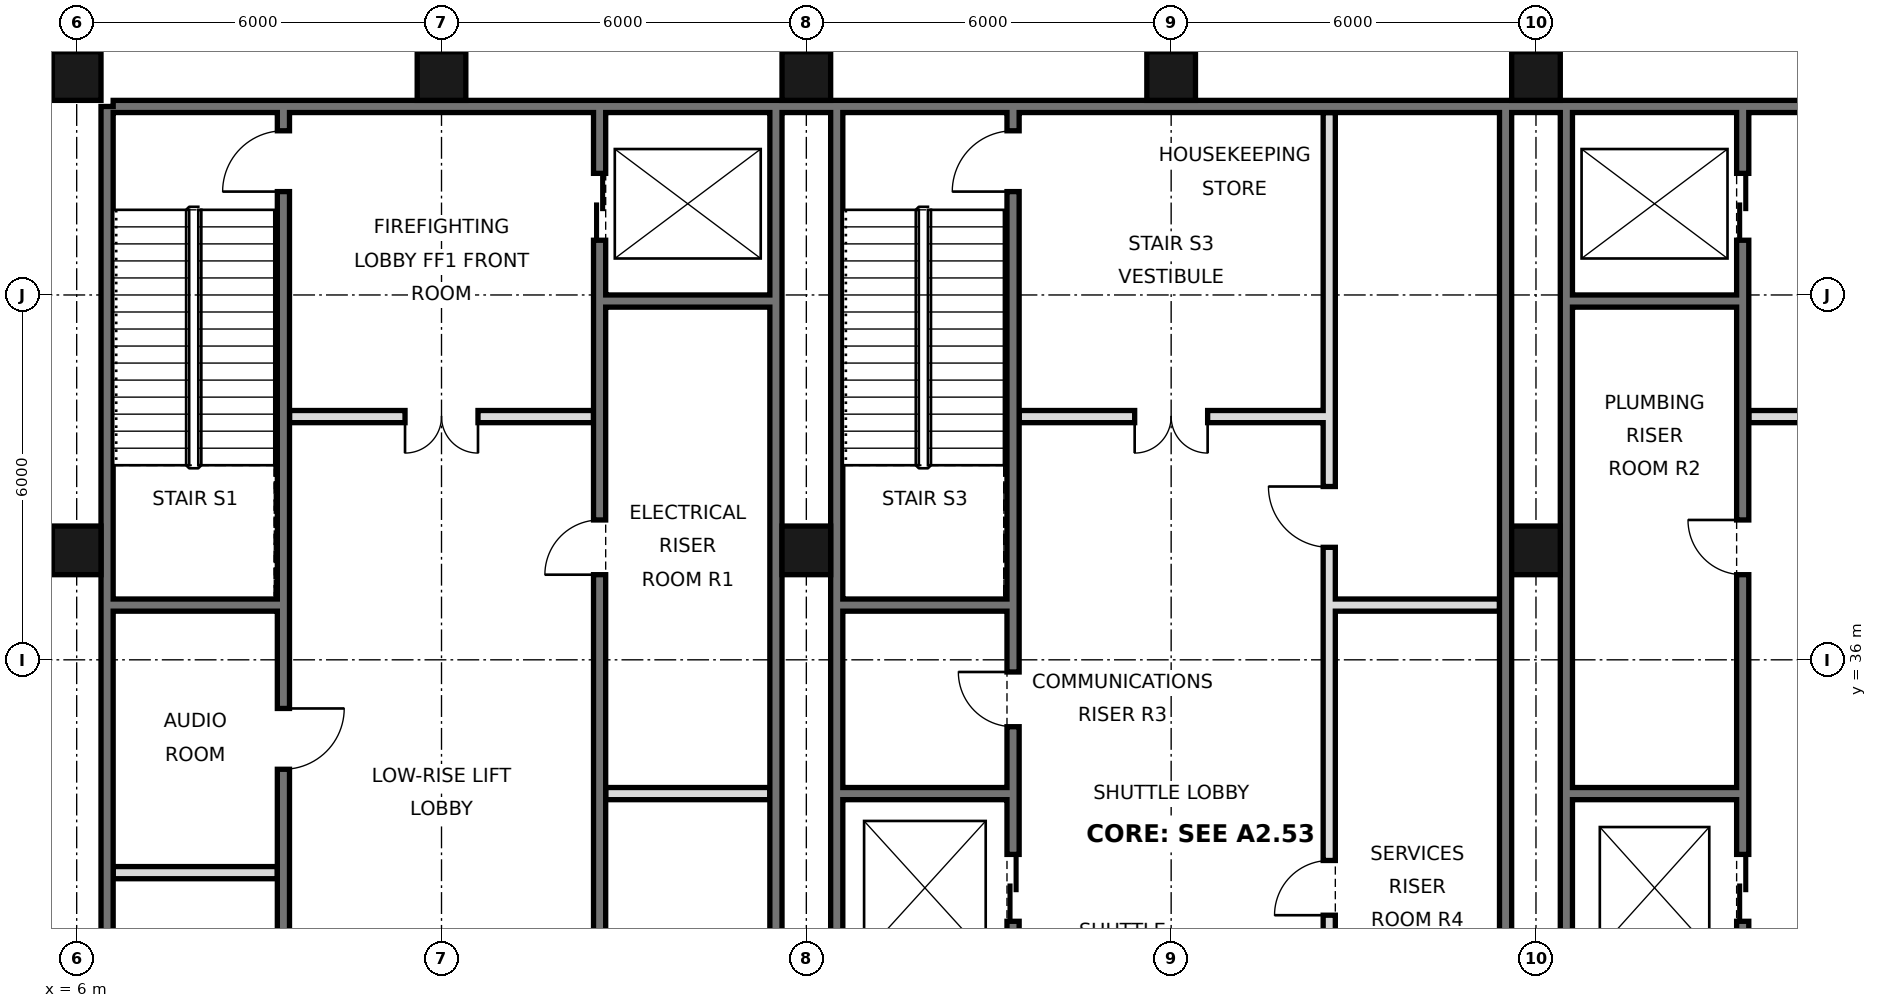
"""IFC4 building model, lengths in metres.
Left out: names, types, materials, properties, quantities, classifications, styles, units other than length and angle.
Written with IfcOpenShell. Run it as: python <this file> out.ifc"""

import sys

from ifc_helpers import new_model, si_unit, direction, frame, frame_2d, origin, origin_2d, place, context, subcontext, project, spatial, rectangle, hollow_rectangle, extrude, element, fill, save


model = new_model("IFC4")
c1 = context("Model", 3, precision=1e-05, world=origin(), true_north=direction((0.0, 1.0)))
c2 = subcontext(c1, "Body", "Model", "MODEL_VIEW")
j1 = project(units=[si_unit("LENGTHUNIT", "METRE"), si_unit("PLANEANGLEUNIT", "RADIAN")], contexts=[c1])
p1 = place(None, origin())
s1 = spatial("IfcSite", under=j1, at=p1, CompositionType="ELEMENT")
p2 = place(p1, origin())
s2 = spatial("IfcBuilding", under=s1, at=p2, CompositionType="ELEMENT")
p3 = place(p2, frame((0.0, 0.0, 210.0)))
s3 = spatial("IfcBuildingStorey", under=s2, at=p3, CompositionType="ELEMENT", Elevation=210.0)
for number, where, z_axis, x_axis in (
    (1, (6.0, 37.8, 0.0), (0.0, 0.0, 1.0), (1.0, 0.0, 0.0)),
    (2, (6.0, 45.6, 0.0), (0.0, 0.0, 1.0), (1.0, 0.0, 0.0)),
    (3, (12.0, 45.6, 0.0), (0.0, 0.0, 1.0), (1.0, 0.0, 0.0)),
    (4, (18.0, 37.8, 0.0), (0.0, 0.0, 1.0), (1.0, 0.0, 0.0)),
    (5, (18.0, 45.6, 0.0), (0.0, 0.0, 1.0), (1.0, 0.0, 0.0)),
    (6, (24.0, 45.6, 0.0), (0.0, 0.0, 1.0), (1.0, 0.0, 0.0)),
    (7, (30.0, 37.8, 0.0), (0.0, 0.0, 1.0), (1.0, 0.0, 0.0)),
    (8, (30.0, 45.6, 0.0), (0.0, 0.0, 1.0), (1.0, 0.0, 0.0)),
):
    element("IfcColumn", number, at=place(p3, frame(where, z_axis=z_axis, x_axis=x_axis)), inside=s3, PredefinedType="COLUMN", context=c2, shape_type="SweptSolid", body=[
        extrude(hollow_rectangle(XDim=0.8, YDim=0.8, WallThickness=0.04, at=origin_2d()), origin(), (0.0, 0.0, 1.0), 5.4),
    ])
p4 = place(p3, frame((6.5, 21.6, 0.0), z_axis=(0.0, 0.0, 1.0), x_axis=(0.0, 1.0, 0.0)))
e9 = element("IfcWall", 9, at=p4, inside=s3, PredefinedType="SOLIDWALL", context=c2, shape_type="SweptSolid", body=[
    extrude(rectangle(XDim=23.5, YDim=0.2, at=frame_2d((11.75, 0.0))), origin(), (0.0, 0.0, 1.0), 5.22),
])
p5 = place(p3, frame((6.6, 45.1, 0.0), z_axis=(0.0, 0.0, 1.0), x_axis=(1.0, 0.0, 0.0)))
e10 = element("IfcWall", 10, at=p5, inside=s3, PredefinedType="SOLIDWALL", context=c2, shape_type="SweptSolid", body=[
    extrude(rectangle(XDim=34.8, YDim=0.2, at=frame_2d((17.4, 0.0))), origin(), (0.0, 0.0, 1.0), 5.22),
])
for number, where, z_axis, x_axis in (
    (11, (17.5, 27.6, 0.0), (0.0, 0.0, 1.0), (0.0, 1.0, 0.0)),
    (12, (18.5, 27.6, 0.0), (0.0, 0.0, 1.0), (0.0, 1.0, 0.0)),
    (13, (29.5, 27.6, 0.0), (0.0, 0.0, 1.0), (0.0, 1.0, 0.0)),
    (14, (30.5, 27.6, 0.0), (0.0, 0.0, 1.0), (0.0, 1.0, 0.0)),
):
    element("IfcWall", number, at=place(p3, frame(where, z_axis=z_axis, x_axis=x_axis)), inside=s3, PredefinedType="SOLIDWALL", context=c2, shape_type="SweptSolid", body=[
        extrude(rectangle(XDim=17.5, YDim=0.2, at=frame_2d((8.75, 0.0))), origin(), (0.0, 0.0, 1.0), 5.22),
    ])
p6 = place(p3, frame((14.6, 27.5, 0.0), z_axis=(0.0, 0.0, 1.0), x_axis=(0.0, 1.0, 0.0)))
e15 = element("IfcWall", 15, at=p6, inside=s3, PredefinedType="SOLIDWALL", context=c2, shape_type="SweptSolid", body=[
    extrude(rectangle(XDim=17.5, YDim=0.2, at=frame_2d((8.75, 0.0))), origin(), (0.0, 0.0, 1.0), 5.22),
])
p7 = place(p6, frame((15.4, 0.0, 0.0)))
e16 = element("IfcOpeningElement", 16, at=p7, cuts=e15, PredefinedType="OPENING", context=c2, shape_type="SweptSolid", body=[
    extrude(rectangle(XDim=1.1, YDim=2.1, at=frame_2d((0.55, 1.05))), frame((0.0, 0.11, 0.0), z_axis=(0.0, -1.0, 0.0), x_axis=(1.0, 0.0, 0.0)), (0.0, 0.0, 1.0), 0.22),
])
p8 = place(p6, frame((2.7, 0.0, 0.0)))
e17 = element("IfcOpeningElement", 17, at=p8, cuts=e15, PredefinedType="OPENING", context=c2, shape_type="SweptSolid", body=[
    extrude(rectangle(XDim=1.0, YDim=2.1, at=frame_2d((0.5, 1.05))), frame((0.0, 0.11, 0.0), z_axis=(0.0, -1.0, 0.0), x_axis=(1.0, 0.0, 0.0)), (0.0, 0.0, 1.0), 0.22),
])
p9 = place(p6, frame((9.9, 0.0, 0.0)))
e18 = element("IfcOpeningElement", 18, at=p9, cuts=e15, PredefinedType="OPENING", context=c2, shape_type="SweptSolid", body=[
    extrude(rectangle(XDim=0.9, YDim=2.1, at=frame_2d((0.45, 1.05))), frame((0.0, 0.11, 0.0), z_axis=(0.0, -1.0, 0.0), x_axis=(1.0, 0.0, 0.0)), (0.0, 0.0, 1.0), 0.22),
])
p10 = place(p3, frame((21.4, 27.5, 0.0), z_axis=(0.0, 0.0, 1.0), x_axis=(0.0, 1.0, 0.0)))
e19 = element("IfcWall", 19, at=p10, inside=s3, PredefinedType="SOLIDWALL", context=c2, shape_type="SweptSolid", body=[
    extrude(rectangle(XDim=17.5, YDim=0.2, at=frame_2d((8.75, 0.0))), origin(), (0.0, 0.0, 1.0), 5.22),
])
p11 = place(p10, frame((1.1, 0.0, 0.0)))
e20 = element("IfcOpeningElement", 20, at=p11, cuts=e19, PredefinedType="OPENING", context=c2, shape_type="SweptSolid", body=[
    extrude(rectangle(XDim=1.1, YDim=2.1, at=frame_2d((0.55, 1.05))), frame((0.0, 0.11, 0.0), z_axis=(0.0, -1.0, 0.0), x_axis=(1.0, 0.0, 0.0)), (0.0, 0.0, 1.0), 0.22),
])
p12 = place(p10, frame((4.2, 0.0, 0.0)))
e21 = element("IfcOpeningElement", 21, at=p12, cuts=e19, PredefinedType="OPENING", context=c2, shape_type="SweptSolid", body=[
    extrude(rectangle(XDim=1.1, YDim=2.1, at=frame_2d((0.55, 1.05))), frame((0.0, 0.11, 0.0), z_axis=(0.0, -1.0, 0.0), x_axis=(1.0, 0.0, 0.0)), (0.0, 0.0, 1.0), 0.22),
])
p13 = place(p10, frame((16.2, 0.0, 0.0)))
e22 = element("IfcOpeningElement", 22, at=p13, cuts=e19, PredefinedType="OPENING", context=c2, shape_type="SweptSolid", body=[
    extrude(rectangle(XDim=1.0, YDim=2.1, at=frame_2d((0.5, 1.05))), frame((0.0, 0.11, 0.0), z_axis=(0.0, -1.0, 0.0), x_axis=(1.0, 0.0, 0.0)), (0.0, 0.0, 1.0), 0.22),
])
p14 = place(p10, frame((7.4, 0.0, 0.0)))
e23 = element("IfcOpeningElement", 23, at=p14, cuts=e19, PredefinedType="OPENING", context=c2, shape_type="SweptSolid", body=[
    extrude(rectangle(XDim=0.9, YDim=2.1, at=frame_2d((0.45, 1.05))), frame((0.0, 0.11, 0.0), z_axis=(0.0, -1.0, 0.0), x_axis=(1.0, 0.0, 0.0)), (0.0, 0.0, 1.0), 0.22),
])
p15 = place(p3, frame((26.6, 27.5, 0.0), z_axis=(0.0, 0.0, 1.0), x_axis=(0.0, 1.0, 0.0)))
e24 = element("IfcWall", 24, at=p15, inside=s3, PredefinedType="SOLIDWALL", context=c2, shape_type="SweptSolid", body=[
    extrude(rectangle(XDim=17.5, YDim=0.2, at=frame_2d((8.75, 0.0))), origin(), (0.0, 0.0, 1.0), 5.22),
])
p16 = place(p15, frame((4.3, 0.0, 0.0)))
e25 = element("IfcOpeningElement", 25, at=p16, cuts=e24, PredefinedType="OPENING", context=c2, shape_type="SweptSolid", body=[
    extrude(rectangle(XDim=0.9, YDim=2.1, at=frame_2d((0.45, 1.05))), frame((0.0, 0.11, 0.0), z_axis=(0.0, -1.0, 0.0), x_axis=(1.0, 0.0, 0.0)), (0.0, 0.0, 1.0), 0.22),
])
p17 = place(p15, frame((10.35, 0.0, 0.0)))
e26 = element("IfcOpeningElement", 26, at=p17, cuts=e24, PredefinedType="OPENING", context=c2, shape_type="SweptSolid", body=[
    extrude(rectangle(XDim=1.0, YDim=2.1, at=frame_2d((0.5, 1.05))), frame((0.0, 0.11, 0.0), z_axis=(0.0, -1.0, 0.0), x_axis=(1.0, 0.0, 0.0)), (0.0, 0.0, 1.0), 0.22),
])
p18 = place(p3, frame((33.4, 27.5, 0.0), z_axis=(0.0, 0.0, 1.0), x_axis=(0.0, 1.0, 0.0)))
e27 = element("IfcWall", 27, at=p18, inside=s3, PredefinedType="SOLIDWALL", context=c2, shape_type="SweptSolid", body=[
    extrude(rectangle(XDim=17.5, YDim=0.2, at=frame_2d((8.75, 0.0))), origin(), (0.0, 0.0, 1.0), 5.22),
])
p19 = place(p18, frame((1.1, 0.0, 0.0)))
e28 = element("IfcOpeningElement", 28, at=p19, cuts=e27, PredefinedType="OPENING", context=c2, shape_type="SweptSolid", body=[
    extrude(rectangle(XDim=1.1, YDim=2.1, at=frame_2d((0.55, 1.05))), frame((0.0, 0.11, 0.0), z_axis=(0.0, -1.0, 0.0), x_axis=(1.0, 0.0, 0.0)), (0.0, 0.0, 1.0), 0.22),
])
p20 = place(p18, frame((4.2, 0.0, 0.0)))
e29 = element("IfcOpeningElement", 29, at=p20, cuts=e27, PredefinedType="OPENING", context=c2, shape_type="SweptSolid", body=[
    extrude(rectangle(XDim=1.1, YDim=2.1, at=frame_2d((0.55, 1.05))), frame((0.0, 0.11, 0.0), z_axis=(0.0, -1.0, 0.0), x_axis=(1.0, 0.0, 0.0)), (0.0, 0.0, 1.0), 0.22),
])
p21 = place(p18, frame((15.4, 0.0, 0.0)))
e30 = element("IfcOpeningElement", 30, at=p21, cuts=e27, PredefinedType="OPENING", context=c2, shape_type="SweptSolid", body=[
    extrude(rectangle(XDim=1.1, YDim=2.1, at=frame_2d((0.55, 1.05))), frame((0.0, 0.11, 0.0), z_axis=(0.0, -1.0, 0.0), x_axis=(1.0, 0.0, 0.0)), (0.0, 0.0, 1.0), 0.22),
])
p22 = place(p18, frame((9.9, 0.0, 0.0)))
e31 = element("IfcOpeningElement", 31, at=p22, cuts=e27, PredefinedType="OPENING", context=c2, shape_type="SweptSolid", body=[
    extrude(rectangle(XDim=0.9, YDim=2.1, at=frame_2d((0.45, 1.05))), frame((0.0, 0.11, 0.0), z_axis=(0.0, -1.0, 0.0), x_axis=(1.0, 0.0, 0.0)), (0.0, 0.0, 1.0), 0.22),
])
p23 = place(p3, frame((9.4, 21.6, 0.0), z_axis=(0.0, 0.0, 1.0), x_axis=(0.0, 1.0, 0.0)))
e32 = element("IfcWall", 32, at=p23, inside=s3, PredefinedType="SOLIDWALL", context=c2, shape_type="SweptSolid", body=[
    extrude(rectangle(XDim=23.4, YDim=0.2, at=frame_2d((11.7, 0.0))), origin(), (0.0, 0.0, 1.0), 5.22),
])
p24 = place(p23, frame((7.95, 0.0, 0.0)))
e33 = element("IfcOpeningElement", 33, at=p24, cuts=e32, PredefinedType="OPENING", context=c2, shape_type="SweptSolid", body=[
    extrude(rectangle(XDim=1.0, YDim=2.1, at=frame_2d((0.5, 1.05))), frame((0.0, 0.11, 0.0), z_axis=(0.0, -1.0, 0.0), x_axis=(1.0, 0.0, 0.0)), (0.0, 0.0, 1.0), 0.22),
])
p25 = place(p23, frame((12.6, 0.0, 0.0)))
e34 = element("IfcOpeningElement", 34, at=p25, cuts=e32, PredefinedType="OPENING", context=c2, shape_type="SweptSolid", body=[
    extrude(rectangle(XDim=1.0, YDim=2.1, at=frame_2d((0.5, 1.05))), frame((0.0, 0.11, 0.0), z_axis=(0.0, -1.0, 0.0), x_axis=(1.0, 0.0, 0.0)), (0.0, 0.0, 1.0), 0.22),
])
p26 = place(p23, frame((22.1, 0.0, 0.0)))
e35 = element("IfcOpeningElement", 35, at=p26, cuts=e32, PredefinedType="OPENING", context=c2, shape_type="SweptSolid", body=[
    extrude(rectangle(XDim=1.0, YDim=2.1, at=frame_2d((0.5, 1.05))), frame((0.0, 0.11, 0.0), z_axis=(0.0, -1.0, 0.0), x_axis=(1.0, 0.0, 0.0)), (0.0, 0.0, 1.0), 0.22),
])
p27 = place(p23, frame((0.175, 0.0, 0.0)))
e36 = element("IfcOpeningElement", 36, at=p27, cuts=e32, PredefinedType="OPENING", context=c2, shape_type="SweptSolid", body=[
    extrude(rectangle(XDim=0.9, YDim=2.1, at=frame_2d((0.45, 1.05))), frame((0.0, 0.11, 0.0), z_axis=(0.0, -1.0, 0.0), x_axis=(1.0, 0.0, 0.0)), (0.0, 0.0, 1.0), 0.22),
])
p28 = place(p3, frame((6.6, 32.5, 0.0), z_axis=(0.0, 0.0, 1.0), x_axis=(1.0, 0.0, 0.0)))
e37 = element("IfcWall", 37, at=p28, inside=s3, PredefinedType="PARTITIONING", context=c2, shape_type="SweptSolid", body=[
    extrude(rectangle(XDim=2.7, YDim=0.2, at=frame_2d((1.35, 0.0))), origin(), (0.0, 0.0, 1.0), 5.22),
])
for number, where, z_axis, x_axis in (
    (38, (14.7, 33.8, 0.0), (0.0, 0.0, 1.0), (1.0, 0.0, 0.0)),
    (39, (18.6, 33.8, 0.0), (0.0, 0.0, 1.0), (1.0, 0.0, 0.0)),
    (40, (30.6, 33.8, 0.0), (0.0, 0.0, 1.0), (1.0, 0.0, 0.0)),
    (41, (18.6, 36.9, 0.0), (0.0, 0.0, 1.0), (1.0, 0.0, 0.0)),
    (42, (26.7, 36.9, 0.0), (0.0, 0.0, 1.0), (1.0, 0.0, 0.0)),
    (43, (6.6, 36.9, 0.0), (0.0, 0.0, 1.0), (1.0, 0.0, 0.0)),
):
    element("IfcWall", number, at=place(p3, frame(where, z_axis=z_axis, x_axis=x_axis)), inside=s3, PredefinedType="SOLIDWALL", context=c2, shape_type="SweptSolid", body=[
        extrude(rectangle(XDim=2.7, YDim=0.2, at=frame_2d((1.35, 0.0))), origin(), (0.0, 0.0, 1.0), 5.22),
    ])
p29 = place(p3, frame((21.5, 40.0, 0.0), z_axis=(0.0, 0.0, 1.0), x_axis=(1.0, 0.0, 0.0)))
e44 = element("IfcWall", 44, at=p29, inside=s3, PredefinedType="PARTITIONING", context=c2, shape_type="SweptSolid", body=[
    extrude(rectangle(XDim=5.0, YDim=0.2, at=frame_2d((2.5, 0.0))), origin(), (0.0, 0.0, 1.0), 5.22),
])
p30 = place(p29, frame((1.9, 0.0, 0.0)))
e45 = element("IfcOpeningElement", 45, at=p30, cuts=e44, PredefinedType="OPENING", context=c2, shape_type="SweptSolid", body=[
    extrude(rectangle(XDim=1.2, YDim=2.1, at=frame_2d((0.6, 1.05))), frame((0.0, 0.11, 0.0), z_axis=(0.0, -1.0, 0.0), x_axis=(1.0, 0.0, 0.0)), (0.0, 0.0, 1.0), 0.22),
])
p31 = place(p3, frame((33.5, 40.0, 0.0), z_axis=(0.0, 0.0, 1.0), x_axis=(1.0, 0.0, 0.0)))
e46 = element("IfcWall", 46, at=p31, inside=s3, PredefinedType="PARTITIONING", context=c2, shape_type="SweptSolid", body=[
    extrude(rectangle(XDim=5.0, YDim=0.2, at=frame_2d((2.5, 0.0))), origin(), (0.0, 0.0, 1.0), 5.22),
])
p32 = place(p31, frame((1.9, 0.0, 0.0)))
e47 = element("IfcOpeningElement", 47, at=p32, cuts=e46, PredefinedType="OPENING", context=c2, shape_type="SweptSolid", body=[
    extrude(rectangle(XDim=1.2, YDim=2.1, at=frame_2d((0.6, 1.05))), frame((0.0, 0.11, 0.0), z_axis=(0.0, -1.0, 0.0), x_axis=(1.0, 0.0, 0.0)), (0.0, 0.0, 1.0), 0.22),
])
p33 = place(p3, frame((9.5, 40.0, 0.0), z_axis=(0.0, 0.0, 1.0), x_axis=(1.0, 0.0, 0.0)))
e48 = element("IfcWall", 48, at=p33, inside=s3, PredefinedType="PARTITIONING", context=c2, shape_type="SweptSolid", body=[
    extrude(rectangle(XDim=5.0, YDim=0.2, at=frame_2d((2.5, 0.0))), origin(), (0.0, 0.0, 1.0), 5.22),
])
p34 = place(p33, frame((1.9, 0.0, 0.0)))
e49 = element("IfcOpeningElement", 49, at=p34, cuts=e48, PredefinedType="OPENING", context=c2, shape_type="SweptSolid", body=[
    extrude(rectangle(XDim=1.2, YDim=2.1, at=frame_2d((0.6, 1.05))), frame((0.0, 0.11, 0.0), z_axis=(0.0, -1.0, 0.0), x_axis=(1.0, 0.0, 0.0)), (0.0, 0.0, 1.0), 0.22),
])
for number, where, z_axis, x_axis in (
    (50, (14.7, 41.9, 0.0), (0.0, 0.0, 1.0), (1.0, 0.0, 0.0)),
    (51, (30.6, 41.9, 0.0), (0.0, 0.0, 1.0), (1.0, 0.0, 0.0)),
):
    element("IfcWall", number, at=place(p3, frame(where, z_axis=z_axis, x_axis=x_axis)), inside=s3, PredefinedType="SOLIDWALL", context=c2, shape_type="SweptSolid", body=[
        extrude(rectangle(XDim=2.7, YDim=0.2, at=frame_2d((1.35, 0.0))), origin(), (0.0, 0.0, 1.0), 5.22),
    ])
p35 = place(p34, frame((1.2, 0.0, 0.0), z_axis=(0.0, 0.0, 1.0), x_axis=(-1.0, 0.0, 0.0)))
e52 = element("IfcDoor", 52, at=p35, inside=s3, OperationType="DOUBLE_DOOR_SINGLE_SWING", PredefinedType="DOOR", context=c2, shape_type="SweptSolid", body=[
    extrude(rectangle(XDim=1.2, YDim=2.1, at=frame_2d((0.6, 1.05))), frame((0.0, 0.025, 0.0), z_axis=(0.0, -1.0, 0.0), x_axis=(1.0, 0.0, 0.0)), (0.0, 0.0, 1.0), 0.05),
])
fill(e49, e52)
p36 = place(p30, frame((1.2, 0.0, 0.0), z_axis=(0.0, 0.0, 1.0), x_axis=(-1.0, 0.0, 0.0)))
e53 = element("IfcDoor", 53, at=p36, inside=s3, OperationType="DOUBLE_DOOR_SINGLE_SWING", PredefinedType="DOOR", context=c2, shape_type="SweptSolid", body=[
    extrude(rectangle(XDim=1.2, YDim=2.1, at=frame_2d((0.6, 1.05))), frame((0.0, 0.025, 0.0), z_axis=(0.0, -1.0, 0.0), x_axis=(1.0, 0.0, 0.0)), (0.0, 0.0, 1.0), 0.05),
])
fill(e45, e53)
p37 = place(p12, origin())
e54 = element("IfcDoor", 54, at=p37, inside=s3, OperationType="DOUBLE_DOOR_SLIDING", PredefinedType="DOOR", context=c2, shape_type="SweptSolid", body=[
    extrude(rectangle(XDim=1.1, YDim=2.1, at=frame_2d((0.55, 1.05))), frame((0.0, 0.025, 0.0), z_axis=(0.0, -1.0, 0.0), x_axis=(1.0, 0.0, 0.0)), (0.0, 0.0, 1.0), 0.05),
])
fill(e21, e54)
p38 = place(p20, origin())
e55 = element("IfcDoor", 55, at=p38, inside=s3, OperationType="DOUBLE_DOOR_SLIDING", PredefinedType="DOOR", context=c2, shape_type="SweptSolid", body=[
    extrude(rectangle(XDim=1.1, YDim=2.1, at=frame_2d((0.55, 1.05))), frame((0.0, 0.025, 0.0), z_axis=(0.0, -1.0, 0.0), x_axis=(1.0, 0.0, 0.0)), (0.0, 0.0, 1.0), 0.05),
])
fill(e29, e55)
p39 = place(p21, origin())
e56 = element("IfcDoor", 56, at=p39, inside=s3, OperationType="DOUBLE_DOOR_SLIDING", PredefinedType="DOOR", context=c2, shape_type="SweptSolid", body=[
    extrude(rectangle(XDim=1.1, YDim=2.1, at=frame_2d((0.55, 1.05))), frame((0.0, 0.025, 0.0), z_axis=(0.0, -1.0, 0.0), x_axis=(1.0, 0.0, 0.0)), (0.0, 0.0, 1.0), 0.05),
])
fill(e30, e56)
p40 = place(p7, origin())
e57 = element("IfcDoor", 57, at=p40, inside=s3, OperationType="DOUBLE_DOOR_SLIDING", PredefinedType="DOOR", context=c2, shape_type="SweptSolid", body=[
    extrude(rectangle(XDim=1.1, YDim=2.1, at=frame_2d((0.55, 1.05))), frame((0.0, 0.025, 0.0), z_axis=(0.0, -1.0, 0.0), x_axis=(1.0, 0.0, 0.0)), (0.0, 0.0, 1.0), 0.05),
])
fill(e16, e57)
p41 = place(p25, origin())
e58 = element("IfcDoor", 58, at=p41, inside=s3, OperationType="SINGLE_SWING_RIGHT", PredefinedType="DOOR", context=c2, shape_type="SweptSolid", body=[
    extrude(rectangle(XDim=1.0, YDim=2.1, at=frame_2d((0.5, 1.05))), frame((0.0, 0.025, 0.0), z_axis=(0.0, -1.0, 0.0), x_axis=(1.0, 0.0, 0.0)), (0.0, 0.0, 1.0), 0.05),
])
fill(e34, e58)
p42 = place(p26, origin())
e59 = element("IfcDoor", 59, at=p42, inside=s3, OperationType="SINGLE_SWING_LEFT", PredefinedType="DOOR", context=c2, shape_type="SweptSolid", body=[
    extrude(rectangle(XDim=1.0, YDim=2.1, at=frame_2d((0.5, 1.05))), frame((0.0, 0.025, 0.0), z_axis=(0.0, -1.0, 0.0), x_axis=(1.0, 0.0, 0.0)), (0.0, 0.0, 1.0), 0.05),
])
fill(e35, e59)
p43 = place(p13, origin())
e60 = element("IfcDoor", 60, at=p43, inside=s3, OperationType="SINGLE_SWING_LEFT", PredefinedType="DOOR", context=c2, shape_type="SweptSolid", body=[
    extrude(rectangle(XDim=1.0, YDim=2.1, at=frame_2d((0.5, 1.05))), frame((0.0, 0.025, 0.0), z_axis=(0.0, -1.0, 0.0), x_axis=(1.0, 0.0, 0.0)), (0.0, 0.0, 1.0), 0.05),
])
fill(e22, e60)
p44 = place(p9, origin())
e61 = element("IfcDoor", 61, at=p44, inside=s3, OperationType="SINGLE_SWING_LEFT", PredefinedType="DOOR", context=c2, shape_type="SweptSolid", body=[
    extrude(rectangle(XDim=0.9, YDim=2.1, at=frame_2d((0.45, 1.05))), frame((0.0, 0.025, 0.0), z_axis=(0.0, -1.0, 0.0), x_axis=(1.0, 0.0, 0.0)), (0.0, 0.0, 1.0), 0.05),
])
fill(e18, e61)
p45 = place(p22, frame((0.9, 0.0, 0.0), z_axis=(0.0, 0.0, 1.0), x_axis=(-1.0, 0.0, 0.0)))
e62 = element("IfcDoor", 62, at=p45, inside=s3, OperationType="SINGLE_SWING_LEFT", PredefinedType="DOOR", context=c2, shape_type="SweptSolid", body=[
    extrude(rectangle(XDim=0.9, YDim=2.1, at=frame_2d((0.45, 1.05))), frame((0.0, 0.025, 0.0), z_axis=(0.0, -1.0, 0.0), x_axis=(1.0, 0.0, 0.0)), (0.0, 0.0, 1.0), 0.05),
])
fill(e31, e62)
p46 = place(p14, frame((0.9, 0.0, 0.0), z_axis=(0.0, 0.0, 1.0), x_axis=(-1.0, 0.0, 0.0)))
e63 = element("IfcDoor", 63, at=p46, inside=s3, OperationType="SINGLE_SWING_LEFT", PredefinedType="DOOR", context=c2, shape_type="SweptSolid", body=[
    extrude(rectangle(XDim=0.9, YDim=2.1, at=frame_2d((0.45, 1.05))), frame((0.0, 0.025, 0.0), z_axis=(0.0, -1.0, 0.0), x_axis=(1.0, 0.0, 0.0)), (0.0, 0.0, 1.0), 0.05),
])
fill(e23, e63)
p47 = place(p16, origin())
e64 = element("IfcDoor", 64, at=p47, inside=s3, OperationType="SINGLE_SWING_LEFT", PredefinedType="DOOR", context=c2, shape_type="SweptSolid", body=[
    extrude(rectangle(XDim=0.9, YDim=2.1, at=frame_2d((0.45, 1.05))), frame((0.0, 0.025, 0.0), z_axis=(0.0, -1.0, 0.0), x_axis=(1.0, 0.0, 0.0)), (0.0, 0.0, 1.0), 0.05),
])
fill(e25, e64)
p48 = place(p17, frame((1.0, 0.0, 0.0), z_axis=(0.0, 0.0, 1.0), x_axis=(-1.0, 0.0, 0.0)))
e65 = element("IfcDoor", 65, at=p48, inside=s3, OperationType="SINGLE_SWING_LEFT", PredefinedType="DOOR", context=c2, shape_type="SweptSolid", body=[
    extrude(rectangle(XDim=1.0, YDim=2.1, at=frame_2d((0.5, 1.05))), frame((0.0, 0.025, 0.0), z_axis=(0.0, -1.0, 0.0), x_axis=(1.0, 0.0, 0.0)), (0.0, 0.0, 1.0), 0.05),
])
fill(e26, e65)
save(model, sys.argv[1])
